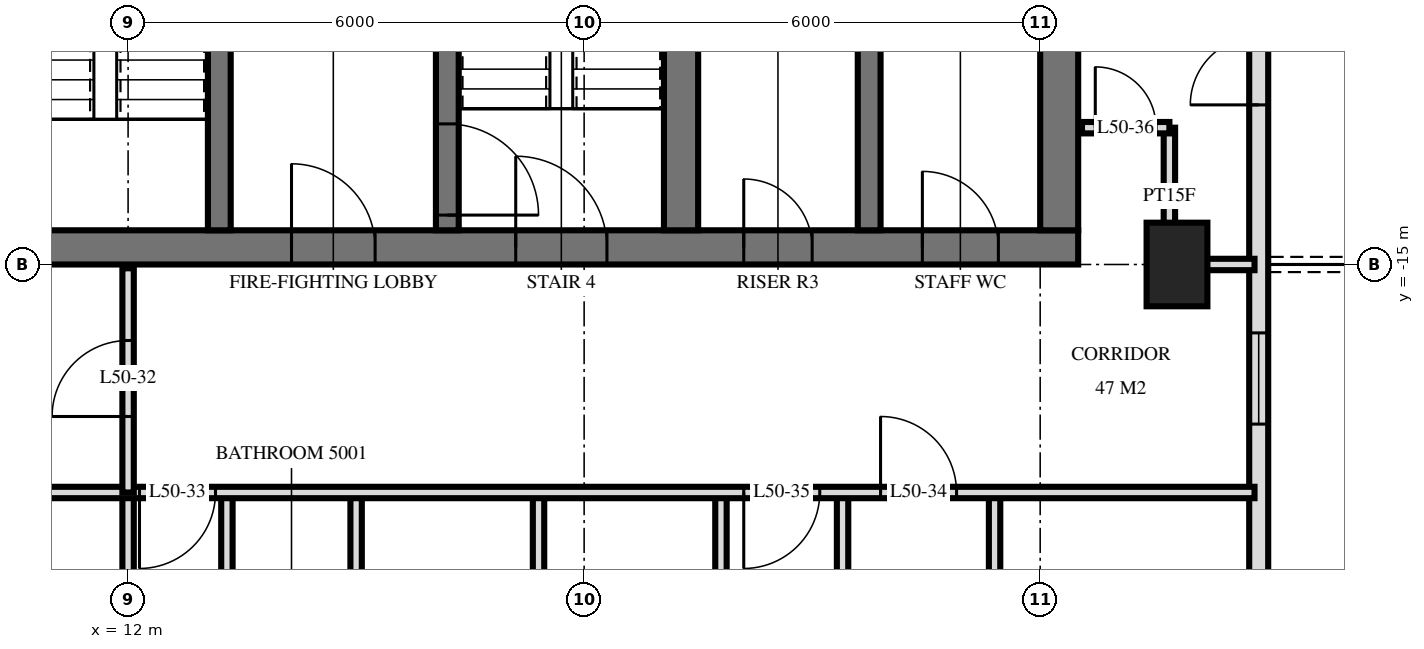
"""IFC4 building model, lengths in metres.
Left out: names, types, materials, properties, quantities, classifications, styles, units other than length and angle.
Written with IfcOpenShell. Run it as: python <this file> out.ifc"""

import sys

from ifc_helpers import new_model, si_unit, direction, frame, frame_2d, origin, origin_2d, place, context, subcontext, project, spatial, rectangle, extrude, element, fill, save


model = new_model("IFC4")
c1 = context("Model", 3, precision=1e-05, world=origin(), true_north=direction((0.0, 1.0)))
c2 = subcontext(c1, "Body", "Model", "MODEL_VIEW")
j1 = project(units=[si_unit("LENGTHUNIT", "METRE"), si_unit("PLANEANGLEUNIT", "RADIAN")], contexts=[c1])
p1 = place(None, origin())
s1 = spatial("IfcSite", under=j1, at=p1, CompositionType="ELEMENT")
p2 = place(p1, origin())
s2 = spatial("IfcBuilding", under=s1, at=p2, CompositionType="ELEMENT")
p3 = place(p2, frame((0.0, 0.0, 194.1)))
s3 = spatial("IfcBuildingStorey", under=s2, at=p3, CompositionType="ELEMENT", Elevation=194.1)
p4 = place(p3, frame((25.8, -15.0, 0.0), z_axis=(0.0, 0.0, 1.0), x_axis=(0.0, 1.0, 0.0)))
e1 = element("IfcColumn", 1, at=p4, inside=s3, PredefinedType="COLUMN", context=c2, shape_type="SweptSolid", body=[
    extrude(rectangle(XDim=1.1, YDim=0.8, at=origin_2d()), origin(), (0.0, 0.0, 1.0), 3.5),
])
p5 = place(p3, frame((10.0, -14.775, 0.0), z_axis=(0.0, 0.0, 1.0), x_axis=(1.0, 0.0, 0.0)))
e2 = element("IfcWall", 2, at=p5, inside=s3, PredefinedType="SHEAR", context=c2, shape_type="SweptSolid", body=[
    extrude(rectangle(XDim=14.5, YDim=0.45, at=frame_2d((7.25, 0.0))), origin(), (0.0, 0.0, 1.0), 3.5),
])
p6 = place(p5, frame((7.1, 0.0, 0.0)))
e3 = element("IfcOpeningElement", 3, at=p6, cuts=e2, PredefinedType="OPENING", context=c2, shape_type="SweptSolid", body=[
    extrude(rectangle(XDim=1.2, YDim=2.1, at=frame_2d((0.6, 1.05))), frame((0.0, 0.235, 0.0), z_axis=(0.0, -1.0, 0.0), x_axis=(1.0, 0.0, 0.0)), (0.0, 0.0, 1.0), 0.47),
])
p7 = place(p5, frame((4.15, 0.0, 0.0)))
e4 = element("IfcOpeningElement", 4, at=p7, cuts=e2, PredefinedType="OPENING", context=c2, shape_type="SweptSolid", body=[
    extrude(rectangle(XDim=1.1, YDim=2.1, at=frame_2d((0.55, 1.05))), frame((0.0, 0.235, 0.0), z_axis=(0.0, -1.0, 0.0), x_axis=(1.0, 0.0, 0.0)), (0.0, 0.0, 1.0), 0.47),
])
p8 = place(p5, frame((10.1, 0.0, 0.0)))
e5 = element("IfcOpeningElement", 5, at=p8, cuts=e2, PredefinedType="OPENING", context=c2, shape_type="SweptSolid", body=[
    extrude(rectangle(XDim=0.9, YDim=2.1, at=frame_2d((0.45, 1.05))), frame((0.0, 0.235, 0.0), z_axis=(0.0, -1.0, 0.0), x_axis=(1.0, 0.0, 0.0)), (0.0, 0.0, 1.0), 0.47),
])
p9 = place(p5, frame((12.45, 0.0, 0.0)))
e6 = element("IfcOpeningElement", 6, at=p9, cuts=e2, PredefinedType="OPENING", context=c2, shape_type="SweptSolid", body=[
    extrude(rectangle(XDim=1.0, YDim=2.1, at=frame_2d((0.5, 1.05))), frame((0.0, 0.235, 0.0), z_axis=(0.0, -1.0, 0.0), x_axis=(1.0, 0.0, 0.0)), (0.0, 0.0, 1.0), 0.47),
])
p10 = place(p3, frame((24.25, -14.55, 0.0), z_axis=(0.0, 0.0, 1.0), x_axis=(0.0, 1.0, 0.0)))
e7 = element("IfcWall", 7, at=p10, inside=s3, PredefinedType="SHEAR", context=c2, shape_type="SweptSolid", body=[
    extrude(rectangle(XDim=14.1, YDim=0.5, at=frame_2d((7.05, 0.0))), origin(), (0.0, 0.0, 1.0), 3.5),
])
p11 = place(p3, frame((13.2, -14.55, 0.0), z_axis=(0.0, 0.0, 1.0), x_axis=(0.0, 1.0, 0.0)))
e8 = element("IfcWall", 8, at=p11, inside=s3, PredefinedType="SHEAR", context=c2, shape_type="SweptSolid", body=[
    extrude(rectangle(XDim=5.4, YDim=0.3, at=frame_2d((2.7, 0.0))), origin(), (0.0, 0.0, 1.0), 3.5),
])
p12 = place(p11, frame((4.0, 0.0, 0.0)))
e9 = element("IfcOpeningElement", 9, at=p12, cuts=e8, PredefinedType="OPENING", context=c2, shape_type="SweptSolid", body=[
    extrude(rectangle(XDim=1.2, YDim=2.1, at=frame_2d((0.6, 1.05))), frame((0.0, 0.16, 0.0), z_axis=(0.0, -1.0, 0.0), x_axis=(1.0, 0.0, 0.0)), (0.0, 0.0, 1.0), 0.32),
])
p13 = place(p3, frame((16.2, -14.55, 0.0), z_axis=(0.0, 0.0, 1.0), x_axis=(0.0, 1.0, 0.0)))
e10 = element("IfcWall", 10, at=p13, inside=s3, PredefinedType="SHEAR", context=c2, shape_type="SweptSolid", body=[
    extrude(rectangle(XDim=5.4, YDim=0.3, at=frame_2d((2.7, 0.0))), origin(), (0.0, 0.0, 1.0), 3.5),
])
p14 = place(p13, frame((0.2, 0.0, 0.0)))
e11 = element("IfcOpeningElement", 11, at=p14, cuts=e10, PredefinedType="OPENING", context=c2, shape_type="SweptSolid", body=[
    extrude(rectangle(XDim=1.2, YDim=2.1, at=frame_2d((0.6, 1.05))), frame((0.0, 0.16, 0.0), z_axis=(0.0, -1.0, 0.0), x_axis=(1.0, 0.0, 0.0)), (0.0, 0.0, 1.0), 0.32),
])
p15 = place(p3, frame((19.275, -14.55, 0.0), z_axis=(0.0, 0.0, 1.0), x_axis=(0.0, 1.0, 0.0)))
e12 = element("IfcWall", 12, at=p15, inside=s3, PredefinedType="SHEAR", context=c2, shape_type="SweptSolid", body=[
    extrude(rectangle(XDim=5.4, YDim=0.45, at=frame_2d((2.7, 0.0))), origin(), (0.0, 0.0, 1.0), 3.5),
])
p16 = place(p3, frame((21.75, -14.55, 0.0), z_axis=(0.0, 0.0, 1.0), x_axis=(0.0, 1.0, 0.0)))
e13 = element("IfcWall", 13, at=p16, inside=s3, PredefinedType="SHEAR", context=c2, shape_type="SweptSolid", body=[
    extrude(rectangle(XDim=5.4, YDim=0.3, at=frame_2d((2.7, 0.0))), origin(), (0.0, 0.0, 1.0), 3.5),
])
p17 = place(p3, frame((26.875, -24.875, 0.0), z_axis=(0.0, 0.0, 1.0), x_axis=(0.0, 1.0, 0.0)))
e14 = element("IfcWall", 14, at=p17, inside=s3, PredefinedType="SOLIDWALL", context=c2, shape_type="SweptSolid", body=[
    extrude(rectangle(XDim=21.551, YDim=0.25, at=frame_2d((10.775, 0.0))), origin(), (0.0, 0.0, 1.0), 3.22),
])
p18 = place(p17, frame((0.425, 0.0, 0.0)))
e15 = element("IfcOpeningElement", 15, at=p18, cuts=e14, PredefinedType="OPENING", context=c2, shape_type="SweptSolid", body=[
    extrude(rectangle(XDim=1.8, YDim=2.4, at=frame_2d((0.9, 1.2))), frame((0.0, 0.135, 0.0), z_axis=(0.0, -1.0, 0.0), x_axis=(1.0, 0.0, 0.0)), (0.0, 0.0, 1.0), 0.27),
])
p19 = place(p17, frame((3.875, 0.0, 0.0)))
e16 = element("IfcOpeningElement", 16, at=p19, cuts=e14, PredefinedType="OPENING", context=c2, shape_type="SweptSolid", body=[
    extrude(rectangle(XDim=1.8, YDim=2.4, at=frame_2d((0.9, 1.2))), frame((0.0, 0.135, 0.0), z_axis=(0.0, -1.0, 0.0), x_axis=(1.0, 0.0, 0.0)), (0.0, 0.0, 1.0), 0.27),
])
p20 = place(p17, frame((7.775, 0.0, 0.9)))
e17 = element("IfcOpeningElement", 17, at=p20, cuts=e14, PredefinedType="OPENING", context=c2, shape_type="SweptSolid", body=[
    extrude(rectangle(XDim=1.2, YDim=1.5, at=frame_2d((0.6, 0.75))), frame((0.0, 0.135, 0.0), z_axis=(0.0, -1.0, 0.0), x_axis=(1.0, 0.0, 0.0)), (0.0, 0.0, 1.0), 0.27),
])
p21 = place(p17, frame((11.975, 0.0, 0.0)))
e18 = element("IfcOpeningElement", 18, at=p21, cuts=e14, PredefinedType="OPENING", context=c2, shape_type="SweptSolid", body=[
    extrude(rectangle(XDim=1.8, YDim=2.4, at=frame_2d((0.9, 1.2))), frame((0.0, 0.135, 0.0), z_axis=(0.0, -1.0, 0.0), x_axis=(1.0, 0.0, 0.0)), (0.0, 0.0, 1.0), 0.27),
])
p22 = place(p3, frame((25.7, -15.0, 0.0), z_axis=(0.0, 0.0, 1.0), x_axis=(0.0, 1.0, 0.0)))
e19 = element("IfcWall", 19, at=p22, inside=s3, PredefinedType="PARTITIONING", context=c2, shape_type="SweptSolid", body=[
    extrude(rectangle(XDim=1.8, YDim=0.15, at=frame_2d((0.9, 0.0))), origin(), (0.0, 0.0, 1.0), 3.22),
])
p23 = place(p3, frame((23.4, -22.2, 0.0), z_axis=(0.0, 0.0, 1.0), x_axis=(0.0, 1.0, 0.0)))
e20 = element("IfcWall", 20, at=p23, inside=s3, PredefinedType="PARTITIONING", context=c2, shape_type="SweptSolid", body=[
    extrude(rectangle(XDim=4.2, YDim=0.15, at=frame_2d((2.1, 0.0))), origin(), (0.0, 0.0, 1.0), 3.22),
])
p24 = place(p23, frame((1.62, 0.0, 0.0)))
e21 = element("IfcOpeningElement", 21, at=p24, cuts=e20, PredefinedType="OPENING", context=c2, shape_type="SweptSolid", body=[
    extrude(rectangle(XDim=1.0, YDim=2.1, at=frame_2d((0.5, 1.05))), frame((0.0, 0.085, 0.0), z_axis=(0.0, -1.0, 0.0), x_axis=(1.0, 0.0, 0.0)), (0.0, 0.0, 1.0), 0.17),
])
for number, where, z_axis, x_axis in (
    (22, (21.4, -22.2, 0.0), (0.0, 0.0, 1.0), (0.0, 1.0, 0.0)),
    (23, (19.8, -22.2, 0.0), (0.0, 0.0, 1.0), (0.0, 1.0, 0.0)),
    (24, (17.4, -22.2, 0.0), (0.0, 0.0, 1.0), (0.0, 1.0, 0.0)),
):
    element("IfcWall", number, at=place(p3, frame(where, z_axis=z_axis, x_axis=x_axis)), inside=s3, PredefinedType="PARTITIONING", context=c2, shape_type="SweptSolid", body=[
        extrude(rectangle(XDim=4.2, YDim=0.15, at=frame_2d((2.1, 0.0))), origin(), (0.0, 0.0, 1.0), 3.22),
    ])
p25 = place(p3, frame((15.0, -29.22, 0.0), z_axis=(0.0, 0.0, 1.0), x_axis=(0.0, 1.0, 0.0)))
e25 = element("IfcWall", 25, at=p25, inside=s3, PredefinedType="PARTITIONING", context=c2, shape_type="SweptSolid", body=[
    extrude(rectangle(XDim=11.22, YDim=0.15, at=frame_2d((5.61, 0.0))), origin(), (0.0, 0.0, 1.0), 3.22),
])
p26 = place(p3, frame((13.3, -22.2, 0.0), z_axis=(0.0, 0.0, 1.0), x_axis=(0.0, 1.0, 0.0)))
e26 = element("IfcWall", 26, at=p26, inside=s3, PredefinedType="PARTITIONING", context=c2, shape_type="SweptSolid", body=[
    extrude(rectangle(XDim=4.2, YDim=0.15, at=frame_2d((2.1, 0.0))), origin(), (0.0, 0.0, 1.0), 3.22),
])
p27 = place(p26, frame((1.72, 0.0, 0.0)))
e27 = element("IfcOpeningElement", 27, at=p27, cuts=e26, PredefinedType="OPENING", context=c2, shape_type="SweptSolid", body=[
    extrude(rectangle(XDim=0.8, YDim=2.1, at=frame_2d((0.4, 1.05))), frame((0.0, 0.085, 0.0), z_axis=(0.0, -1.0, 0.0), x_axis=(1.0, 0.0, 0.0)), (0.0, 0.0, 1.0), 0.17),
])
p28 = place(p3, frame((12.0, -18.0, 0.0), z_axis=(0.0, 0.0, 1.0), x_axis=(0.0, 1.0, 0.0)))
e28 = element("IfcWall", 28, at=p28, inside=s3, PredefinedType="PARTITIONING", context=c2, shape_type="SweptSolid", body=[
    extrude(rectangle(XDim=2.95, YDim=0.15, at=frame_2d((1.475, 0.0))), origin(), (0.0, 0.0, 1.0), 3.22),
])
p29 = place(p28, frame((1.0, 0.0, 0.0)))
e29 = element("IfcOpeningElement", 29, at=p29, cuts=e28, PredefinedType="OPENING", context=c2, shape_type="SweptSolid", body=[
    extrude(rectangle(XDim=1.0, YDim=2.1, at=frame_2d((0.5, 1.05))), frame((0.0, 0.085, 0.0), z_axis=(0.0, -1.0, 0.0), x_axis=(1.0, 0.0, 0.0)), (0.0, 0.0, 1.0), 0.17),
])
p30 = place(p3, frame((12.0, -29.22, 0.0), z_axis=(0.0, 0.0, 1.0), x_axis=(0.0, 1.0, 0.0)))
e30 = element("IfcWall", 30, at=p30, inside=s3, PredefinedType="PARTITIONING", context=c2, shape_type="SweptSolid", body=[
    extrude(rectangle(XDim=11.22, YDim=0.15, at=frame_2d((5.61, 0.0))), origin(), (0.0, 0.0, 1.0), 3.22),
])
p31 = place(p3, frame((-26.82, -18.0, 0.0), z_axis=(0.0, 0.0, 1.0), x_axis=(1.0, 0.0, 0.0)))
e31 = element("IfcWall", 31, at=p31, inside=s3, PredefinedType="PARTITIONING", context=c2, shape_type="SweptSolid", body=[
    extrude(rectangle(XDim=53.64, YDim=0.15, at=frame_2d((26.82, 0.0))), origin(), (0.0, 0.0, 1.0), 3.22),
])
p32 = place(p31, frame((11.32, 0.0, 0.0)))
e32 = element("IfcOpeningElement", 32, at=p32, cuts=e31, PredefinedType="OPENING", context=c2, shape_type="SweptSolid", body=[
    extrude(rectangle(XDim=1.0, YDim=2.1, at=frame_2d((0.5, 1.05))), frame((0.0, 0.085, 0.0), z_axis=(0.0, -1.0, 0.0), x_axis=(1.0, 0.0, 0.0)), (0.0, 0.0, 1.0), 0.17),
])
p33 = place(p31, frame((3.22, 0.0, 0.0)))
e33 = element("IfcOpeningElement", 33, at=p33, cuts=e31, PredefinedType="OPENING", context=c2, shape_type="SweptSolid", body=[
    extrude(rectangle(XDim=1.0, YDim=2.1, at=frame_2d((0.5, 1.05))), frame((0.0, 0.085, 0.0), z_axis=(0.0, -1.0, 0.0), x_axis=(1.0, 0.0, 0.0)), (0.0, 0.0, 1.0), 0.17),
])
p34 = place(p31, frame((5.02, 0.0, 0.0)))
e34 = element("IfcOpeningElement", 34, at=p34, cuts=e31, PredefinedType="OPENING", context=c2, shape_type="SweptSolid", body=[
    extrude(rectangle(XDim=1.0, YDim=2.1, at=frame_2d((0.5, 1.05))), frame((0.0, 0.085, 0.0), z_axis=(0.0, -1.0, 0.0), x_axis=(1.0, 0.0, 0.0)), (0.0, 0.0, 1.0), 0.17),
])
p35 = place(p31, frame((38.97, 0.0, 0.0)))
e35 = element("IfcOpeningElement", 35, at=p35, cuts=e31, PredefinedType="OPENING", context=c2, shape_type="SweptSolid", body=[
    extrude(rectangle(XDim=1.0, YDim=2.1, at=frame_2d((0.5, 1.05))), frame((0.0, 0.085, 0.0), z_axis=(0.0, -1.0, 0.0), x_axis=(1.0, 0.0, 0.0)), (0.0, 0.0, 1.0), 0.17),
])
p36 = place(p31, frame((48.72, 0.0, 0.0)))
e36 = element("IfcOpeningElement", 36, at=p36, cuts=e31, PredefinedType="OPENING", context=c2, shape_type="SweptSolid", body=[
    extrude(rectangle(XDim=1.0, YDim=2.1, at=frame_2d((0.5, 1.05))), frame((0.0, 0.085, 0.0), z_axis=(0.0, -1.0, 0.0), x_axis=(1.0, 0.0, 0.0)), (0.0, 0.0, 1.0), 0.17),
])
p37 = place(p31, frame((46.92, 0.0, 0.0)))
e37 = element("IfcOpeningElement", 37, at=p37, cuts=e31, PredefinedType="OPENING", context=c2, shape_type="SweptSolid", body=[
    extrude(rectangle(XDim=1.0, YDim=2.1, at=frame_2d((0.5, 1.05))), frame((0.0, 0.085, 0.0), z_axis=(0.0, -1.0, 0.0), x_axis=(1.0, 0.0, 0.0)), (0.0, 0.0, 1.0), 0.17),
])
p38 = place(p31, frame((17.32, 0.0, 0.0)))
e38 = element("IfcOpeningElement", 38, at=p38, cuts=e31, PredefinedType="OPENING", context=c2, shape_type="SweptSolid", body=[
    extrude(rectangle(XDim=1.0, YDim=2.1, at=frame_2d((0.5, 1.05))), frame((0.0, 0.085, 0.0), z_axis=(0.0, -1.0, 0.0), x_axis=(1.0, 0.0, 0.0)), (0.0, 0.0, 1.0), 0.17),
])
p39 = place(p31, frame((23.32, 0.0, 0.0)))
e39 = element("IfcOpeningElement", 39, at=p39, cuts=e31, PredefinedType="OPENING", context=c2, shape_type="SweptSolid", body=[
    extrude(rectangle(XDim=1.0, YDim=2.1, at=frame_2d((0.5, 1.05))), frame((0.0, 0.085, 0.0), z_axis=(0.0, -1.0, 0.0), x_axis=(1.0, 0.0, 0.0)), (0.0, 0.0, 1.0), 0.17),
])
p40 = place(p31, frame((29.32, 0.0, 0.0)))
e40 = element("IfcOpeningElement", 40, at=p40, cuts=e31, PredefinedType="OPENING", context=c2, shape_type="SweptSolid", body=[
    extrude(rectangle(XDim=1.0, YDim=2.1, at=frame_2d((0.5, 1.05))), frame((0.0, 0.085, 0.0), z_axis=(0.0, -1.0, 0.0), x_axis=(1.0, 0.0, 0.0)), (0.0, 0.0, 1.0), 0.17),
])
p41 = place(p31, frame((35.32, 0.0, 0.0)))
e41 = element("IfcOpeningElement", 41, at=p41, cuts=e31, PredefinedType="OPENING", context=c2, shape_type="SweptSolid", body=[
    extrude(rectangle(XDim=1.0, YDim=2.1, at=frame_2d((0.5, 1.05))), frame((0.0, 0.085, 0.0), z_axis=(0.0, -1.0, 0.0), x_axis=(1.0, 0.0, 0.0)), (0.0, 0.0, 1.0), 0.17),
])
p42 = place(p3, frame((25.7, -15.0, 0.0), z_axis=(0.0, 0.0, 1.0), x_axis=(1.0, 0.0, 0.0)))
e42 = element("IfcWall", 42, at=p42, inside=s3, PredefinedType="PARTITIONING", context=c2, shape_type="SweptSolid", body=[
    extrude(rectangle(XDim=1.12, YDim=0.15, at=frame_2d((0.56, 0.0))), origin(), (0.0, 0.0, 1.0), 3.22),
])
p43 = place(p3, frame((24.55, -13.2, 0.0), z_axis=(0.0, 0.0, 1.0), x_axis=(1.0, 0.0, 0.0)))
e43 = element("IfcWall", 43, at=p43, inside=s3, PredefinedType="PARTITIONING", context=c2, shape_type="SweptSolid", body=[
    extrude(rectangle(XDim=1.15, YDim=0.15, at=frame_2d((0.575, 0.0))), origin(), (0.0, 0.0, 1.0), 3.22),
])
p44 = place(p43, frame((0.175, 0.0, 0.0)))
e44 = element("IfcOpeningElement", 44, at=p44, cuts=e43, PredefinedType="OPENING", context=c2, shape_type="SweptSolid", body=[
    extrude(rectangle(XDim=0.8, YDim=2.1, at=frame_2d((0.4, 1.05))), frame((0.0, 0.085, 0.0), z_axis=(0.0, -1.0, 0.0), x_axis=(1.0, 0.0, 0.0)), (0.0, 0.0, 1.0), 0.17),
])
p45 = place(p20, origin())
e45 = element("IfcWindow", 45, at=p45, inside=s3, PartitioningType="SINGLE_PANEL", PredefinedType="WINDOW", context=c2, shape_type="SweptSolid", body=[
    extrude(rectangle(XDim=1.2, YDim=1.5, at=frame_2d((0.6, 0.75))), frame((0.0, 0.03, 0.0), z_axis=(0.0, -1.0, 0.0), x_axis=(1.0, 0.0, 0.0)), (0.0, 0.0, 1.0), 0.06),
])
fill(e17, e45)
p46 = place(p21, origin())
e46 = element("IfcDoor", 46, at=p46, inside=s3, OperationType="DOUBLE_DOOR_SINGLE_SWING", PredefinedType="DOOR", context=c2, shape_type="SweptSolid", body=[
    extrude(rectangle(XDim=1.8, YDim=2.4, at=frame_2d((0.9, 1.2))), frame((0.0, 0.025, 0.0), z_axis=(0.0, -1.0, 0.0), x_axis=(1.0, 0.0, 0.0)), (0.0, 0.0, 1.0), 0.05),
])
fill(e18, e46)
p47 = place(p6, origin())
e47 = element("IfcDoor", 47, at=p47, inside=s3, OperationType="SINGLE_SWING_RIGHT", PredefinedType="DOOR", context=c2, shape_type="SweptSolid", body=[
    extrude(rectangle(XDim=1.2, YDim=2.1, at=frame_2d((0.6, 1.05))), frame((0.0, 0.025, 0.0), z_axis=(0.0, -1.0, 0.0), x_axis=(1.0, 0.0, 0.0)), (0.0, 0.0, 1.0), 0.05),
])
fill(e3, e47)
p48 = place(p7, origin())
e48 = element("IfcDoor", 48, at=p48, inside=s3, OperationType="SINGLE_SWING_RIGHT", PredefinedType="DOOR", context=c2, shape_type="SweptSolid", body=[
    extrude(rectangle(XDim=1.1, YDim=2.1, at=frame_2d((0.55, 1.05))), frame((0.0, 0.025, 0.0), z_axis=(0.0, -1.0, 0.0), x_axis=(1.0, 0.0, 0.0)), (0.0, 0.0, 1.0), 0.05),
])
fill(e4, e48)
p49 = place(p8, origin())
e49 = element("IfcDoor", 49, at=p49, inside=s3, OperationType="SINGLE_SWING_RIGHT", PredefinedType="DOOR", context=c2, shape_type="SweptSolid", body=[
    extrude(rectangle(XDim=0.9, YDim=2.1, at=frame_2d((0.45, 1.05))), frame((0.0, 0.025, 0.0), z_axis=(0.0, -1.0, 0.0), x_axis=(1.0, 0.0, 0.0)), (0.0, 0.0, 1.0), 0.05),
])
fill(e5, e49)
p50 = place(p9, origin())
e50 = element("IfcDoor", 50, at=p50, inside=s3, OperationType="SINGLE_SWING_RIGHT", PredefinedType="DOOR", context=c2, shape_type="SweptSolid", body=[
    extrude(rectangle(XDim=1.0, YDim=2.1, at=frame_2d((0.5, 1.05))), frame((0.0, 0.025, 0.0), z_axis=(0.0, -1.0, 0.0), x_axis=(1.0, 0.0, 0.0)), (0.0, 0.0, 1.0), 0.05),
])
fill(e6, e50)
p51 = place(p14, frame((0.6, 0.0, 0.0), z_axis=(0.0, 0.0, 1.0), x_axis=(-1.0, 0.0, 0.0)))
e51 = element("IfcDoor", 51, at=p51, inside=s3, OperationType="SINGLE_SWING_LEFT", PredefinedType="DOOR", context=c2, shape_type="SweptSolid", body=[
    extrude(rectangle(XDim=1.2, YDim=2.1, at=frame_2d((0.0, 1.05))), frame((0.0, -0.025, 0.0), z_axis=(0.0, 1.0, 0.0), x_axis=(-1.0, 0.0, 0.0)), (0.0, 0.0, 1.0), 0.05),
])
fill(e11, e51)
p52 = place(p29, origin())
e52 = element("IfcDoor", 52, at=p52, inside=s3, OperationType="SINGLE_SWING_RIGHT", PredefinedType="DOOR", context=c2, shape_type="SweptSolid", body=[
    extrude(rectangle(XDim=1.0, YDim=2.1, at=frame_2d((0.5, 1.05))), frame((0.0, 0.025, 0.0), z_axis=(0.0, -1.0, 0.0), x_axis=(1.0, 0.0, 0.0)), (0.0, 0.0, 1.0), 0.05),
])
fill(e29, e52)
p53 = place(p35, frame((0.5, 0.0, 0.0), z_axis=(0.0, 0.0, 1.0), x_axis=(-1.0, 0.0, 0.0)))
e53 = element("IfcDoor", 53, at=p53, inside=s3, OperationType="SINGLE_SWING_LEFT", PredefinedType="DOOR", context=c2, shape_type="SweptSolid", body=[
    extrude(rectangle(XDim=1.0, YDim=2.1, at=frame_2d((0.0, 1.05))), frame((0.0, -0.025, 0.0), z_axis=(0.0, 1.0, 0.0), x_axis=(-1.0, 0.0, 0.0)), (0.0, 0.0, 1.0), 0.05),
])
fill(e35, e53)
p54 = place(p36, origin())
e54 = element("IfcDoor", 54, at=p54, inside=s3, OperationType="SINGLE_SWING_RIGHT", PredefinedType="DOOR", context=c2, shape_type="SweptSolid", body=[
    extrude(rectangle(XDim=1.0, YDim=2.1, at=frame_2d((0.5, 1.05))), frame((0.0, 0.025, 0.0), z_axis=(0.0, -1.0, 0.0), x_axis=(1.0, 0.0, 0.0)), (0.0, 0.0, 1.0), 0.05),
])
fill(e36, e54)
p55 = place(p37, frame((0.5, 0.0, 0.0), z_axis=(0.0, 0.0, 1.0), x_axis=(-1.0, 0.0, 0.0)))
e55 = element("IfcDoor", 55, at=p55, inside=s3, OperationType="SINGLE_SWING_LEFT", PredefinedType="DOOR", context=c2, shape_type="SweptSolid", body=[
    extrude(rectangle(XDim=1.0, YDim=2.1, at=frame_2d((0.0, 1.05))), frame((0.0, -0.025, 0.0), z_axis=(0.0, 1.0, 0.0), x_axis=(-1.0, 0.0, 0.0)), (0.0, 0.0, 1.0), 0.05),
])
fill(e37, e55)
p56 = place(p44, origin())
e56 = element("IfcDoor", 56, at=p56, inside=s3, OperationType="SINGLE_SWING_RIGHT", PredefinedType="DOOR", context=c2, shape_type="SweptSolid", body=[
    extrude(rectangle(XDim=0.8, YDim=2.1, at=frame_2d((0.4, 1.05))), frame((0.0, 0.025, 0.0), z_axis=(0.0, -1.0, 0.0), x_axis=(1.0, 0.0, 0.0)), (0.0, 0.0, 1.0), 0.05),
])
fill(e44, e56)
save(model, sys.argv[1])
